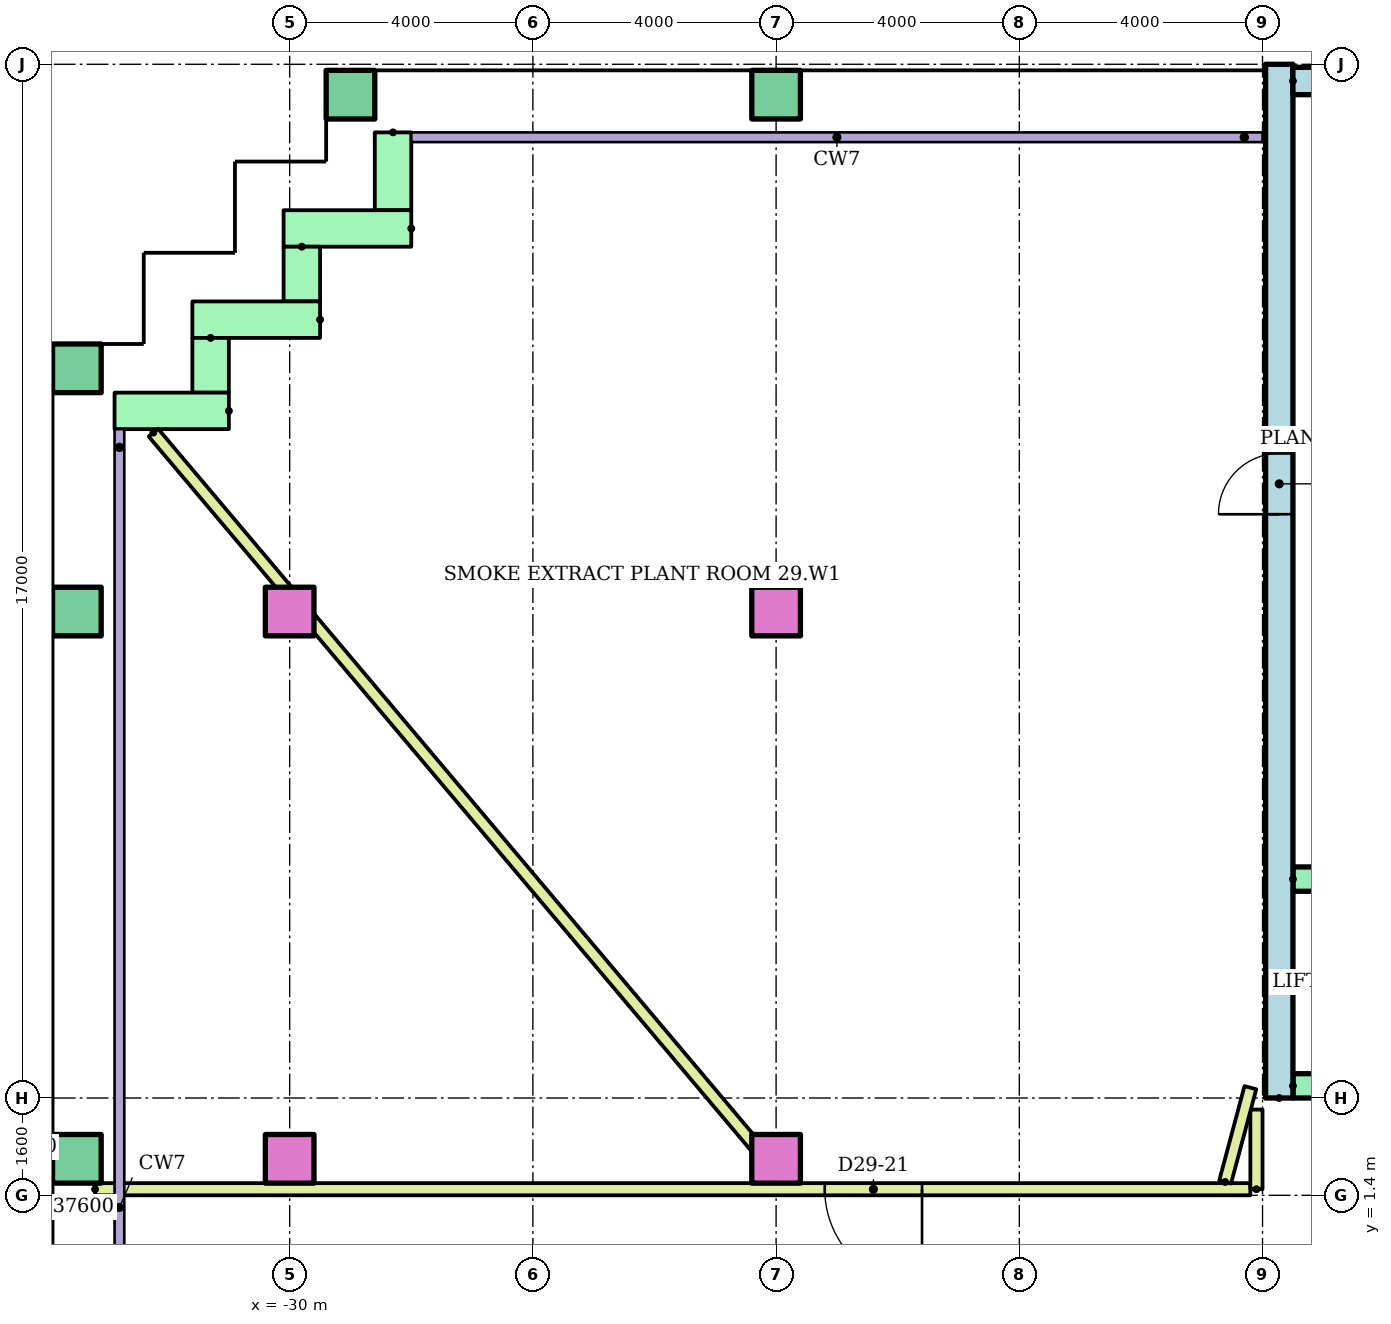
"""IFC4 building model, lengths in metres.
Left out: names, types, materials, properties, quantities, classifications, styles, units other than length and angle.
Written with IfcOpenShell. Run it as: python <this file> out.ifc"""

import sys

from ifc_helpers import new_model, si_unit, direction, frame, frame_2d, origin, origin_2d, place, context, subcontext, project, spatial, rectangle, hollow_rectangle, extrude, element, fill, save


model = new_model("IFC4")
c1 = context("Model", 3, precision=1e-05, world=origin(), true_north=direction((0.0, 1.0)))
c2 = subcontext(c1, "Body", "Model", "MODEL_VIEW")
j1 = project(units=[si_unit("LENGTHUNIT", "METRE"), si_unit("PLANEANGLEUNIT", "RADIAN")], contexts=[c1])
p1 = place(None, origin())
s1 = spatial("IfcSite", under=j1, at=p1, CompositionType="ELEMENT")
p2 = place(p1, origin())
s2 = spatial("IfcBuilding", under=s1, at=p2, CompositionType="ELEMENT")
p3 = place(p2, frame((0.0, 0.0, 115.9)))
s3 = spatial("IfcBuildingStorey", under=s2, at=p3, CompositionType="ELEMENT", Elevation=115.9)
p4 = place(p3, frame((-33.5, 2.0, 0.0)))
e1 = element("IfcColumn", 1, at=p4, inside=s3, PredefinedType="COLUMN", context=c2, shape_type="SweptSolid", body=[
    extrude(hollow_rectangle(XDim=0.8, YDim=0.8, WallThickness=0.04, at=origin_2d()), origin(), (0.0, 0.0, 1.0), 3.9),
])
for number, where in (
    (2, (-30.0, 2.0, 0.0)),
    (3, (-22.0, 2.0, 0.0)),
):
    element("IfcColumn", number, at=place(p3, frame(where)), inside=s3, PredefinedType="COLUMN", context=c2, shape_type="SweptSolid", body=[
        extrude(rectangle(XDim=0.8, YDim=0.8, at=origin_2d()), origin(), (0.0, 0.0, 1.0), 3.9),
    ])
p5 = place(p3, frame((-33.5, 11.0, 0.0)))
e4 = element("IfcColumn", 4, at=p5, inside=s3, PredefinedType="COLUMN", context=c2, shape_type="SweptSolid", body=[
    extrude(hollow_rectangle(XDim=0.8, YDim=0.8, WallThickness=0.04, at=origin_2d()), origin(), (0.0, 0.0, 1.0), 3.9),
])
for number, where in (
    (5, (-30.0, 11.0, 0.0)),
    (6, (-22.0, 11.0, 0.0)),
):
    element("IfcColumn", number, at=place(p3, frame(where)), inside=s3, PredefinedType="COLUMN", context=c2, shape_type="SweptSolid", body=[
        extrude(rectangle(XDim=0.8, YDim=0.8, at=origin_2d()), origin(), (0.0, 0.0, 1.0), 3.9),
    ])
for number, where in (
    (7, (-33.5, 15.0, 0.0)),
    (8, (-29.0, 19.5, 0.0)),
    (9, (-22.0, 19.5, 0.0)),
):
    element("IfcColumn", number, at=place(p3, frame(where)), inside=s3, PredefinedType="COLUMN", context=c2, shape_type="SweptSolid", body=[
        extrude(hollow_rectangle(XDim=0.8, YDim=0.8, WallThickness=0.04, at=origin_2d()), origin(), (0.0, 0.0, 1.0), 3.9),
    ])
p6 = place(p3, frame((-28.3, 18.88, 0.0), z_axis=(0.0, 0.0, 1.0), x_axis=(0.0, -1.0, 0.0)))
e10 = element("IfcWall", 10, at=p6, inside=s3, PredefinedType="STANDARD", context=c2, shape_type="SweptSolid", body=[
    extrude(rectangle(XDim=1.28, YDim=0.6, at=frame_2d((0.64, 0.0))), origin(), (0.0, 0.0, 1.0), 3.62),
])
p7 = place(p3, frame((-28.0, 17.3, 0.0), z_axis=(0.0, 0.0, 1.0), x_axis=(-1.0, 0.0, 0.0)))
e11 = element("IfcWall", 11, at=p7, inside=s3, PredefinedType="STANDARD", context=c2, shape_type="SweptSolid", body=[
    extrude(rectangle(XDim=2.1, YDim=0.6, at=frame_2d((1.05, 0.0))), origin(), (0.0, 0.0, 1.0), 3.62),
])
p8 = place(p3, frame((-29.8, 17.0, 0.0), z_axis=(0.0, 0.0, 1.0), x_axis=(0.0, -1.0, 0.0)))
e12 = element("IfcWall", 12, at=p8, inside=s3, PredefinedType="STANDARD", context=c2, shape_type="SweptSolid", body=[
    extrude(rectangle(XDim=0.9, YDim=0.6, at=frame_2d((0.45, 0.0))), origin(), (0.0, 0.0, 1.0), 3.62),
])
p9 = place(p3, frame((-29.5, 15.8, 0.0), z_axis=(0.0, 0.0, 1.0), x_axis=(-1.0, 0.0, 0.0)))
e13 = element("IfcWall", 13, at=p9, inside=s3, PredefinedType="STANDARD", context=c2, shape_type="SweptSolid", body=[
    extrude(rectangle(XDim=2.1, YDim=0.6, at=frame_2d((1.05, 0.0))), origin(), (0.0, 0.0, 1.0), 3.62),
])
p10 = place(p3, frame((-31.3, 15.5, 0.0), z_axis=(0.0, 0.0, 1.0), x_axis=(0.0, -1.0, 0.0)))
e14 = element("IfcWall", 14, at=p10, inside=s3, PredefinedType="STANDARD", context=c2, shape_type="SweptSolid", body=[
    extrude(rectangle(XDim=0.9, YDim=0.6, at=frame_2d((0.45, 0.0))), origin(), (0.0, 0.0, 1.0), 3.62),
])
p11 = place(p3, frame((-31.0, 14.3, 0.0), z_axis=(0.0, 0.0, 1.0), x_axis=(-1.0, 0.0, 0.0)))
e15 = element("IfcWall", 15, at=p11, inside=s3, PredefinedType="STANDARD", context=c2, shape_type="SweptSolid", body=[
    extrude(rectangle(XDim=1.88, YDim=0.6, at=frame_2d((0.94, 0.0))), origin(), (0.0, 0.0, 1.0), 3.62),
])
p12 = place(p3, frame((-13.725, 3.0, 0.0), z_axis=(0.0, 0.0, 1.0), x_axis=(0.0, 1.0, 0.0)))
e16 = element("IfcWall", 16, at=p12, inside=s3, PredefinedType="SHEAR", context=c2, shape_type="SweptSolid", body=[
    extrude(rectangle(XDim=17.0, YDim=0.45, at=frame_2d((8.5, 0.0))), origin(), (0.0, 0.0, 1.0), 3.62),
])
p13 = place(p12, frame((9.6, 0.0, 0.0)))
e17 = element("IfcOpeningElement", 17, at=p13, cuts=e16, PredefinedType="OPENING", context=c2, shape_type="SweptSolid", body=[
    extrude(rectangle(XDim=1.0, YDim=2.1, at=frame_2d((0.5, 1.05))), frame((0.0, 0.235, 0.0), z_axis=(0.0, -1.0, 0.0), x_axis=(1.0, 0.0, 0.0)), (0.0, 0.0, 1.0), 0.47),
])
p14 = place(p3, frame((-13.5, 19.725, 0.0)))
e18 = element("IfcWall", 18, at=p14, inside=s3, PredefinedType="SHEAR", context=c2, shape_type="SweptSolid", body=[
    extrude(rectangle(XDim=27.0, YDim=0.45, at=frame_2d((13.5, 0.0))), origin(), (0.0, 0.0, 1.0), 3.62),
])
p15 = place(p3, frame((-13.5, 3.2, 0.0)))
e19 = element("IfcWall", 19, at=p15, inside=s3, PredefinedType="SHEAR", context=c2, shape_type="SweptSolid", body=[
    extrude(rectangle(XDim=27.0, YDim=0.4, at=frame_2d((13.5, 0.0))), origin(), (0.0, 0.0, 1.0), 3.62),
])
p16 = place(p15, frame((6.861, 0.0, 0.0)))
e20 = element("IfcOpeningElement", 20, at=p16, cuts=e19, PredefinedType="OPENING", context=c2, shape_type="SweptSolid", body=[
    extrude(rectangle(XDim=1.1, YDim=2.1, at=frame_2d((0.55, 1.05))), frame((0.0, 0.21, 0.0), z_axis=(0.0, -1.0, 0.0), x_axis=(1.0, 0.0, 0.0)), (0.0, 0.0, 1.0), 0.42),
])
p17 = place(p15, frame((9.906, 0.0, 0.0)))
e21 = element("IfcOpeningElement", 21, at=p17, cuts=e19, PredefinedType="OPENING", context=c2, shape_type="SweptSolid", body=[
    extrude(rectangle(XDim=1.1, YDim=2.1, at=frame_2d((0.55, 1.05))), frame((0.0, 0.21, 0.0), z_axis=(0.0, -1.0, 0.0), x_axis=(1.0, 0.0, 0.0)), (0.0, 0.0, 1.0), 0.42),
])
p18 = place(p15, frame((15.994, 0.0, 0.0)))
e22 = element("IfcOpeningElement", 22, at=p18, cuts=e19, PredefinedType="OPENING", context=c2, shape_type="SweptSolid", body=[
    extrude(rectangle(XDim=1.1, YDim=2.1, at=frame_2d((0.55, 1.05))), frame((0.0, 0.21, 0.0), z_axis=(0.0, -1.0, 0.0), x_axis=(1.0, 0.0, 0.0)), (0.0, 0.0, 1.0), 0.42),
])
p19 = place(p15, frame((19.039, 0.0, 0.0)))
e23 = element("IfcOpeningElement", 23, at=p19, cuts=e19, PredefinedType="OPENING", context=c2, shape_type="SweptSolid", body=[
    extrude(rectangle(XDim=1.1, YDim=2.1, at=frame_2d((0.55, 1.05))), frame((0.0, 0.21, 0.0), z_axis=(0.0, -1.0, 0.0), x_axis=(1.0, 0.0, 0.0)), (0.0, 0.0, 1.0), 0.42),
])
p20 = place(p15, frame((12.6, 0.0, 0.0)))
e24 = element("IfcOpeningElement", 24, at=p20, cuts=e19, PredefinedType="OPENING", context=c2, shape_type="SweptSolid", body=[
    extrude(rectangle(XDim=1.8, YDim=2.1, at=frame_2d((0.9, 1.05))), frame((0.0, 0.21, 0.0), z_axis=(0.0, -1.0, 0.0), x_axis=(1.0, 0.0, 0.0)), (0.0, 0.0, 1.0), 0.42),
])
p21 = place(p3, frame((-13.5, 6.6, 0.0)))
e25 = element("IfcWall", 25, at=p21, inside=s3, PredefinedType="SHEAR", context=c2, shape_type="SweptSolid", body=[
    extrude(rectangle(XDim=11.978, YDim=0.4, at=frame_2d((5.989, 0.0))), origin(), (0.0, 0.0, 1.0), 3.62),
])
p22 = place(p3, frame((-33.2, 1.5, 0.0)))
e26 = element("IfcWall", 26, at=p22, inside=s3, PredefinedType="PARTITIONING", context=c2, shape_type="SweptSolid", body=[
    extrude(rectangle(XDim=19.0, YDim=0.2, at=frame_2d((9.5, 0.0))), origin(), (0.0, 0.0, 1.0), 3.62),
])
p23 = place(p22, frame((12.0, 0.0, 0.0)))
e27 = element("IfcOpeningElement", 27, at=p23, cuts=e26, PredefinedType="OPENING", context=c2, shape_type="SweptSolid", body=[
    extrude(rectangle(XDim=1.6, YDim=2.4, at=frame_2d((0.8, 1.2))), frame((0.0, 0.11, 0.0), z_axis=(0.0, -1.0, 0.0), x_axis=(1.0, 0.0, 0.0)), (0.0, 0.0, 1.0), 0.22),
])
p24 = place(p3, frame((-14.1, 1.5, 0.0), z_axis=(0.0, 0.0, 1.0), x_axis=(0.0, 1.0, 0.0)))
e28 = element("IfcWall", 28, at=p24, inside=s3, PredefinedType="PARTITIONING", context=c2, shape_type="SweptSolid", body=[
    extrude(rectangle(XDim=1.31, YDim=0.2, at=frame_2d((0.655, 0.0))), origin(), (0.0, 0.0, 1.0), 3.62),
])
p25 = place(p3, frame((-14.615, 1.619, 0.0), z_axis=(0.0, 0.0, 1.0), x_axis=(0.258429414785, 0.966030143201, 0.0)))
e29 = element("IfcWall", 29, at=p25, inside=s3, PredefinedType="PARTITIONING", context=c2, shape_type="SweptSolid", body=[
    extrude(rectangle(XDim=1.605, YDim=0.2, at=frame_2d((0.802, 0.0))), origin(), (0.0, 0.0, 1.0), 3.62),
])
p26 = place(p3, frame((-32.242, 13.943, 0.0), z_axis=(0.0, 0.0, 1.0), x_axis=(0.644761098281, -0.764384148281, 0.0)))
e30 = element("IfcWall", 30, at=p26, inside=s3, PredefinedType="PARTITIONING", context=c2, shape_type="SweptSolid", body=[
    extrude(rectangle(XDim=16.068, YDim=0.2, at=frame_2d((8.034, 0.0))), origin(), (0.0, 0.0, 1.0), 3.62),
])
p27 = place(p13, origin())
e31 = element("IfcDoor", 31, at=p27, inside=s3, OperationType="SINGLE_SWING_LEFT", PredefinedType="DOOR", context=c2, shape_type="SweptSolid", body=[
    extrude(rectangle(XDim=1.0, YDim=2.1, at=frame_2d((0.5, 1.05))), frame((0.0, 0.025, 0.0), z_axis=(0.0, -1.0, 0.0), x_axis=(1.0, 0.0, 0.0)), (0.0, 0.0, 1.0), 0.05),
])
fill(e17, e31)
p28 = place(p23, frame((1.6, 0.0, 0.0), z_axis=(0.0, 0.0, 1.0), x_axis=(-1.0, 0.0, 0.0)))
e32 = element("IfcDoor", 32, at=p28, inside=s3, OperationType="DOUBLE_DOOR_SINGLE_SWING", PredefinedType="DOOR", context=c2, shape_type="SweptSolid", body=[
    extrude(rectangle(XDim=1.6, YDim=2.4, at=frame_2d((0.8, 1.2))), frame((0.0, 0.025, 0.0), z_axis=(0.0, -1.0, 0.0), x_axis=(1.0, 0.0, 0.0)), (0.0, 0.0, 1.0), 0.05),
])
fill(e27, e32)
save(model, sys.argv[1])
